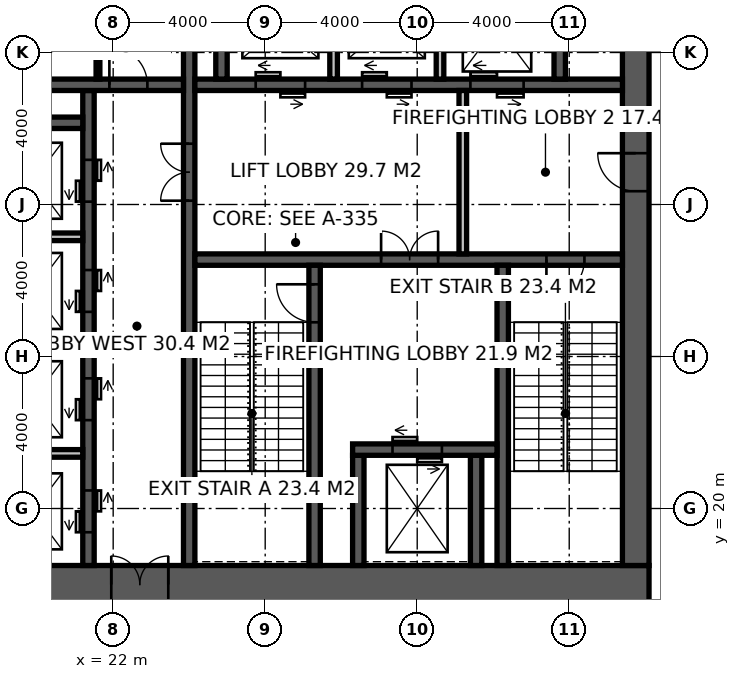
"""IFC4 building model, lengths in metres.
Left out: names, types, materials, properties, quantities, classifications, styles, units other than length and angle.
Written with IfcOpenShell. Run it as: python <this file> out.ifc"""

import sys

from ifc_helpers import new_model, si_unit, direction, frame, frame_2d, origin, place, context, subcontext, project, spatial, rectangle, extrude, element, fill, save


model = new_model("IFC4")
c1 = context("Model", 3, precision=1e-05, world=origin(), true_north=direction((0.0, 1.0)))
c2 = subcontext(c1, "Body", "Model", "MODEL_VIEW")
j1 = project(units=[si_unit("LENGTHUNIT", "METRE"), si_unit("PLANEANGLEUNIT", "RADIAN")], contexts=[c1])
p1 = place(None, origin())
s1 = spatial("IfcSite", under=j1, at=p1, CompositionType="ELEMENT")
p2 = place(p1, origin())
s2 = spatial("IfcBuilding", under=s1, at=p2, CompositionType="ELEMENT")
p3 = place(p2, frame((0.0, 0.0, 209.2)))
s3 = spatial("IfcBuildingStorey", under=s2, at=p3, CompositionType="ELEMENT", Elevation=209.2)
p4 = place(p3, frame((18.5, 18.0, -0.15), z_axis=(0.0, 0.0, 1.0), x_axis=(1.0, 0.0, 0.0)))
e1 = element("IfcWall", 1, at=p4, inside=s3, PredefinedType="SHEAR", context=c2, shape_type="SweptSolid", body=[
    extrude(rectangle(XDim=17.6, YDim=1.0, at=frame_2d((8.8, 0.0))), origin(), (0.0, 0.0, 1.0), 5.0),
])
p5 = place(p4, frame((3.45, 0.0, 0.15)))
e2 = element("IfcOpeningElement", 2, at=p5, cuts=e1, PredefinedType="OPENING", context=c2, shape_type="SweptSolid", body=[
    extrude(rectangle(XDim=1.5, YDim=2.4, at=frame_2d((0.75, 1.2))), frame((0.0, 0.51, 0.0), z_axis=(0.0, -1.0, 0.0), x_axis=(1.0, 0.0, 0.0)), (0.0, 0.0, 1.0), 1.02),
])
p6 = place(p3, frame((35.75, 18.5, -0.15), z_axis=(0.0, 0.0, 1.0), x_axis=(0.0, 1.0, 0.0)))
e3 = element("IfcWall", 3, at=p6, inside=s3, PredefinedType="SHEAR", context=c2, shape_type="SweptSolid", body=[
    extrude(rectangle(XDim=17.0, YDim=0.7, at=frame_2d((8.5, 0.0))), origin(), (0.0, 0.0, 1.0), 5.0),
])
p7 = place(p6, frame((9.85, 0.0, 0.15)))
e4 = element("IfcOpeningElement", 4, at=p7, cuts=e3, PredefinedType="OPENING", context=c2, shape_type="SweptSolid", body=[
    extrude(rectangle(XDim=1.0, YDim=2.2, at=frame_2d((0.5, 1.1))), frame((0.0, 0.36, 0.0), z_axis=(0.0, -1.0, 0.0), x_axis=(1.0, 0.0, 0.0)), (0.0, 0.0, 1.0), 0.72),
])
p8 = place(p3, frame((24.0, 18.5, -0.15), z_axis=(0.0, 0.0, 1.0), x_axis=(0.0, 1.0, 0.0)))
e5 = element("IfcWall", 5, at=p8, inside=s3, PredefinedType="SHEAR", context=c2, shape_type="SweptSolid", body=[
    extrude(rectangle(XDim=17.0, YDim=0.3, at=frame_2d((8.5, 0.0))), origin(), (0.0, 0.0, 1.0), 5.0),
])
p9 = place(p8, frame((9.6, 0.0, 0.15)))
e6 = element("IfcOpeningElement", 6, at=p9, cuts=e5, PredefinedType="OPENING", context=c2, shape_type="SweptSolid", body=[
    extrude(rectangle(XDim=1.5, YDim=2.4, at=frame_2d((0.75, 1.2))), frame((0.0, 0.16, 0.0), z_axis=(0.0, -1.0, 0.0), x_axis=(1.0, 0.0, 0.0)), (0.0, 0.0, 1.0), 0.32),
])
p10 = place(p3, frame((24.15, 26.55, -0.15), z_axis=(0.0, 0.0, 1.0), x_axis=(1.0, 0.0, 0.0)))
e7 = element("IfcWall", 7, at=p10, inside=s3, PredefinedType="SHEAR", context=c2, shape_type="SweptSolid", body=[
    extrude(rectangle(XDim=11.25, YDim=0.3, at=frame_2d((5.625, 0.0))), origin(), (0.0, 0.0, 1.0), 5.0),
])
p11 = place(p10, frame((9.25, 0.0, 0.15)))
e8 = element("IfcOpeningElement", 8, at=p11, cuts=e7, PredefinedType="OPENING", context=c2, shape_type="SweptSolid", body=[
    extrude(rectangle(XDim=1.0, YDim=2.2, at=frame_2d((0.5, 1.1))), frame((0.0, 0.16, 0.0), z_axis=(0.0, -1.0, 0.0), x_axis=(1.0, 0.0, 0.0)), (0.0, 0.0, 1.0), 0.32),
])
p12 = place(p10, frame((4.9, 0.0, 0.15)))
e9 = element("IfcOpeningElement", 9, at=p12, cuts=e7, PredefinedType="OPENING", context=c2, shape_type="SweptSolid", body=[
    extrude(rectangle(XDim=1.5, YDim=2.4, at=frame_2d((0.75, 1.2))), frame((0.0, 0.16, 0.0), z_axis=(0.0, -1.0, 0.0), x_axis=(1.0, 0.0, 0.0)), (0.0, 0.0, 1.0), 0.32),
])
p13 = place(p3, frame((27.3, 18.5, -0.15), z_axis=(0.0, 0.0, 1.0), x_axis=(0.0, 1.0, 0.0)))
e10 = element("IfcWall", 10, at=p13, inside=s3, PredefinedType="SHEAR", context=c2, shape_type="SweptSolid", body=[
    extrude(rectangle(XDim=7.9, YDim=0.3, at=frame_2d((3.95, 0.0))), origin(), (0.0, 0.0, 1.0), 5.0),
])
p14 = place(p13, frame((6.4, 0.0, 0.15)))
e11 = element("IfcOpeningElement", 11, at=p14, cuts=e10, PredefinedType="OPENING", context=c2, shape_type="SweptSolid", body=[
    extrude(rectangle(XDim=1.0, YDim=2.2, at=frame_2d((0.5, 1.1))), frame((0.0, 0.16, 0.0), z_axis=(0.0, -1.0, 0.0), x_axis=(1.0, 0.0, 0.0)), (0.0, 0.0, 1.0), 0.32),
])
p15 = place(p3, frame((32.25, 18.5, -0.15), z_axis=(0.0, 0.0, 1.0), x_axis=(0.0, 1.0, 0.0)))
e12 = element("IfcWall", 12, at=p15, inside=s3, PredefinedType="SHEAR", context=c2, shape_type="SweptSolid", body=[
    extrude(rectangle(XDim=7.9, YDim=0.3, at=frame_2d((3.95, 0.0))), origin(), (0.0, 0.0, 1.0), 5.0),
])
for number, where, z_axis, x_axis in (
    (13, (28.45, 18.5, -0.15), (0.0, 0.0, 1.0), (0.0, 1.0, 0.0)),
    (14, (31.55, 18.5, -0.15), (0.0, 0.0, 1.0), (0.0, 1.0, 0.0)),
):
    element("IfcWall", number, at=place(p3, frame(where, z_axis=z_axis, x_axis=x_axis)), inside=s3, PredefinedType="SHEAR", context=c2, shape_type="SweptSolid", body=[
        extrude(rectangle(XDim=2.9, YDim=0.3, at=frame_2d((1.45, 0.0))), origin(), (0.0, 0.0, 1.0), 5.0),
    ])
p16 = place(p3, frame((28.3, 21.55, -0.15), z_axis=(0.0, 0.0, 1.0), x_axis=(1.0, 0.0, 0.0)))
e15 = element("IfcWall", 15, at=p16, inside=s3, PredefinedType="SHEAR", context=c2, shape_type="SweptSolid", body=[
    extrude(rectangle(XDim=3.8, YDim=0.3, at=frame_2d((1.9, 0.0))), origin(), (0.0, 0.0, 1.0), 5.0),
])
p17 = place(p16, frame((1.05, 0.0, 0.15)))
e16 = element("IfcOpeningElement", 16, at=p17, cuts=e15, PredefinedType="OPENING", context=c2, shape_type="SweptSolid", body=[
    extrude(rectangle(XDim=1.3, YDim=2.4, at=frame_2d((0.65, 1.2))), frame((0.0, 0.16, 0.0), z_axis=(0.0, -1.0, 0.0), x_axis=(1.0, 0.0, 0.0)), (0.0, 0.0, 1.0), 0.32),
])
p18 = place(p3, frame((24.15, 31.15, -0.15), z_axis=(0.0, 0.0, 1.0), x_axis=(1.0, 0.0, 0.0)))
e17 = element("IfcWall", 17, at=p18, inside=s3, PredefinedType="SHEAR", context=c2, shape_type="SweptSolid", body=[
    extrude(rectangle(XDim=11.25, YDim=0.3, at=frame_2d((5.625, 0.0))), origin(), (0.0, 0.0, 1.0), 5.0),
])
p19 = place(p18, frame((1.6, 0.0, 0.15)))
e18 = element("IfcOpeningElement", 18, at=p19, cuts=e17, PredefinedType="OPENING", context=c2, shape_type="SweptSolid", body=[
    extrude(rectangle(XDim=1.3, YDim=2.4, at=frame_2d((0.65, 1.2))), frame((0.0, 0.16, 0.0), z_axis=(0.0, -1.0, 0.0), x_axis=(1.0, 0.0, 0.0)), (0.0, 0.0, 1.0), 0.32),
])
p20 = place(p18, frame((4.4, 0.0, 0.15)))
e19 = element("IfcOpeningElement", 19, at=p20, cuts=e17, PredefinedType="OPENING", context=c2, shape_type="SweptSolid", body=[
    extrude(rectangle(XDim=1.3, YDim=2.4, at=frame_2d((0.65, 1.2))), frame((0.0, 0.16, 0.0), z_axis=(0.0, -1.0, 0.0), x_axis=(1.0, 0.0, 0.0)), (0.0, 0.0, 1.0), 0.32),
])
p21 = place(p18, frame((7.25, 0.0, 0.15)))
e20 = element("IfcOpeningElement", 20, at=p21, cuts=e17, PredefinedType="OPENING", context=c2, shape_type="SweptSolid", body=[
    extrude(rectangle(XDim=1.4, YDim=2.4, at=frame_2d((0.7, 1.2))), frame((0.0, 0.16, 0.0), z_axis=(0.0, -1.0, 0.0), x_axis=(1.0, 0.0, 0.0)), (0.0, 0.0, 1.0), 0.32),
])
p22 = place(p3, frame((21.35, 18.5, -0.15), z_axis=(0.0, 0.0, 1.0), x_axis=(0.0, 1.0, 0.0)))
e21 = element("IfcWall", 21, at=p22, inside=s3, PredefinedType="SHEAR", context=c2, shape_type="SweptSolid", body=[
    extrude(rectangle(XDim=12.5, YDim=0.3, at=frame_2d((6.25, 0.0))), origin(), (0.0, 0.0, 1.0), 5.0),
])
p23 = place(p22, frame((0.875, 0.0, 0.15)))
e22 = element("IfcOpeningElement", 22, at=p23, cuts=e21, PredefinedType="OPENING", context=c2, shape_type="SweptSolid", body=[
    extrude(rectangle(XDim=1.1, YDim=2.2, at=frame_2d((0.55, 1.1))), frame((0.0, 0.16, 0.0), z_axis=(0.0, -1.0, 0.0), x_axis=(1.0, 0.0, 0.0)), (0.0, 0.0, 1.0), 0.32),
])
p24 = place(p22, frame((3.825, 0.0, 0.15)))
e23 = element("IfcOpeningElement", 23, at=p24, cuts=e21, PredefinedType="OPENING", context=c2, shape_type="SweptSolid", body=[
    extrude(rectangle(XDim=1.1, YDim=2.2, at=frame_2d((0.55, 1.1))), frame((0.0, 0.16, 0.0), z_axis=(0.0, -1.0, 0.0), x_axis=(1.0, 0.0, 0.0)), (0.0, 0.0, 1.0), 0.32),
])
p25 = place(p22, frame((6.675, 0.0, 0.15)))
e24 = element("IfcOpeningElement", 24, at=p25, cuts=e21, PredefinedType="OPENING", context=c2, shape_type="SweptSolid", body=[
    extrude(rectangle(XDim=1.1, YDim=2.2, at=frame_2d((0.55, 1.1))), frame((0.0, 0.16, 0.0), z_axis=(0.0, -1.0, 0.0), x_axis=(1.0, 0.0, 0.0)), (0.0, 0.0, 1.0), 0.32),
])
p26 = place(p22, frame((9.575, 0.0, 0.15)))
e25 = element("IfcOpeningElement", 25, at=p26, cuts=e21, PredefinedType="OPENING", context=c2, shape_type="SweptSolid", body=[
    extrude(rectangle(XDim=1.1, YDim=2.2, at=frame_2d((0.55, 1.1))), frame((0.0, 0.16, 0.0), z_axis=(0.0, -1.0, 0.0), x_axis=(1.0, 0.0, 0.0)), (0.0, 0.0, 1.0), 0.32),
])
p27 = place(p3, frame((18.5, 31.15, -0.15), z_axis=(0.0, 0.0, 1.0), x_axis=(1.0, 0.0, 0.0)))
e26 = element("IfcWall", 26, at=p27, inside=s3, PredefinedType="SHEAR", context=c2, shape_type="SweptSolid", body=[
    extrude(rectangle(XDim=5.35, YDim=0.3, at=frame_2d((2.675, 0.0))), origin(), (0.0, 0.0, 1.0), 5.0),
])
p28 = place(p27, frame((3.4, 0.0, 0.15)))
e27 = element("IfcOpeningElement", 27, at=p28, cuts=e26, PredefinedType="OPENING", context=c2, shape_type="SweptSolid", body=[
    extrude(rectangle(XDim=1.0, YDim=2.2, at=frame_2d((0.5, 1.1))), frame((0.0, 0.16, 0.0), z_axis=(0.0, -1.0, 0.0), x_axis=(1.0, 0.0, 0.0)), (0.0, 0.0, 1.0), 0.32),
])
p29 = place(p3, frame((18.5, 30.15, -0.15), z_axis=(0.0, 0.0, 1.0), x_axis=(1.0, 0.0, 0.0)))
e28 = element("IfcWall", 28, at=p29, inside=s3, PredefinedType="SHEAR", context=c2, shape_type="SweptSolid", body=[
    extrude(rectangle(XDim=2.7, YDim=0.3, at=frame_2d((1.35, 0.0))), origin(), (0.0, 0.0, 1.0), 5.0),
])
for number, where, z_axis, x_axis in (
    (29, (24.85, 31.3, -0.15), (0.0, 0.0, 1.0), (0.0, 1.0, 0.0)),
    (30, (33.75, 31.3, -0.15), (0.0, 0.0, 1.0), (0.0, 1.0, 0.0)),
):
    element("IfcWall", number, at=place(p3, frame(where, z_axis=z_axis, x_axis=x_axis)), inside=s3, PredefinedType="SHEAR", context=c2, shape_type="SweptSolid", body=[
        extrude(rectangle(XDim=4.2, YDim=0.3, at=frame_2d((2.1, 0.0))), origin(), (0.0, 0.0, 1.0), 5.0),
    ])
for number, where, z_axis, x_axis in (
    (31, (27.8, 31.3, -0.15), (0.0, 0.0, 1.0), (0.0, 1.0, 0.0)),
    (32, (30.6, 31.3, -0.15), (0.0, 0.0, 1.0), (0.0, 1.0, 0.0)),
):
    element("IfcWall", number, at=place(p3, frame(where, z_axis=z_axis, x_axis=x_axis)), inside=s3, PredefinedType="SOLIDWALL", context=c2, shape_type="SweptSolid", body=[
        extrude(rectangle(XDim=2.8, YDim=0.2, at=frame_2d((1.4, 0.0))), origin(), (0.0, 0.0, 1.0), 5.0),
    ])
for number, where, z_axis, x_axis in (
    (33, (18.5, 21.45, -0.15), (0.0, 0.0, 1.0), (1.0, 0.0, 0.0)),
    (34, (18.5, 24.3, -0.15), (0.0, 0.0, 1.0), (1.0, 0.0, 0.0)),
    (35, (18.5, 27.15, -0.15), (0.0, 0.0, 1.0), (1.0, 0.0, 0.0)),
):
    element("IfcWall", number, at=place(p3, frame(where, z_axis=z_axis, x_axis=x_axis)), inside=s3, PredefinedType="SOLIDWALL", context=c2, shape_type="SweptSolid", body=[
        extrude(rectangle(XDim=2.7, YDim=0.2, at=frame_2d((1.35, 0.0))), origin(), (0.0, 0.0, 1.0), 5.0),
    ])
p30 = place(p3, frame((31.2, 26.7, 0.0), z_axis=(0.0, 0.0, 1.0), x_axis=(0.0, 1.0, 0.0)))
e36 = element("IfcWall", 36, at=p30, inside=s3, PredefinedType="SOLIDWALL", context=c2, shape_type="SweptSolid", body=[
    extrude(rectangle(XDim=4.3, YDim=0.2, at=frame_2d((2.15, 0.0))), origin(), (0.0, 0.0, 1.0), 4.85),
])
p31 = place(p3, frame((21.6, 31.3, 0.0), z_axis=(0.0, 0.0, 1.0), x_axis=(0.0, 1.0, 0.0)))
e37 = element("IfcWall", 37, at=p31, inside=s3, PredefinedType="PARTITIONING", context=c2, shape_type="SweptSolid", body=[
    extrude(rectangle(XDim=4.2, YDim=0.1, at=frame_2d((2.1, 0.0))), origin(), (0.0, 0.0, 1.0), 4.85),
])
p32 = place(p31, frame((1.55, 0.0, 0.0)))
e38 = element("IfcOpeningElement", 38, at=p32, cuts=e37, PredefinedType="OPENING", context=c2, shape_type="SweptSolid", body=[
    extrude(rectangle(XDim=1.0, YDim=2.2, at=frame_2d((0.5, 1.1))), frame((0.0, 0.06, 0.0), z_axis=(0.0, -1.0, 0.0), x_axis=(1.0, 0.0, 0.0)), (0.0, 0.0, 1.0), 0.12),
])
p33 = place(p14, origin())
e39 = element("IfcDoor", 39, at=p33, inside=s3, OperationType="SINGLE_SWING_RIGHT", PredefinedType="DOOR", context=c2, shape_type="SweptSolid", body=[
    extrude(rectangle(XDim=1.0, YDim=2.2, at=frame_2d((0.5, 1.1))), frame((0.0, 0.025, 0.0), z_axis=(0.0, -1.0, 0.0), x_axis=(1.0, 0.0, 0.0)), (0.0, 0.0, 1.0), 0.05),
])
fill(e11, e39)
p34 = place(p11, frame((1.0, 0.0, 0.0), z_axis=(0.0, 0.0, 1.0), x_axis=(-1.0, 0.0, 0.0)))
e40 = element("IfcDoor", 40, at=p34, inside=s3, OperationType="SINGLE_SWING_RIGHT", PredefinedType="DOOR", context=c2, shape_type="SweptSolid", body=[
    extrude(rectangle(XDim=1.0, YDim=2.2, at=frame_2d((0.5, 1.1))), frame((0.0, 0.025, 0.0), z_axis=(0.0, -1.0, 0.0), x_axis=(1.0, 0.0, 0.0)), (0.0, 0.0, 1.0), 0.05),
])
fill(e8, e40)
p35 = place(p7, origin())
e41 = element("IfcDoor", 41, at=p35, inside=s3, OperationType="SINGLE_SWING_RIGHT", PredefinedType="DOOR", context=c2, shape_type="SweptSolid", body=[
    extrude(rectangle(XDim=1.0, YDim=2.2, at=frame_2d((0.5, 1.1))), frame((0.0, 0.025, 0.0), z_axis=(0.0, -1.0, 0.0), x_axis=(1.0, 0.0, 0.0)), (0.0, 0.0, 1.0), 0.05),
])
fill(e4, e41)
p36 = place(p12, origin())
e42 = element("IfcDoor", 42, at=p36, inside=s3, OperationType="DOUBLE_DOOR_DOUBLE_SWING", PredefinedType="DOOR", context=c2, shape_type="SweptSolid", body=[
    extrude(rectangle(XDim=1.5, YDim=2.4, at=frame_2d((0.75, 1.2))), frame((0.0, 0.025, 0.0), z_axis=(0.0, -1.0, 0.0), x_axis=(1.0, 0.0, 0.0)), (0.0, 0.0, 1.0), 0.05),
])
fill(e9, e42)
p37 = place(p9, origin())
e43 = element("IfcDoor", 43, at=p37, inside=s3, OperationType="DOUBLE_DOOR_DOUBLE_SWING", PredefinedType="DOOR", context=c2, shape_type="SweptSolid", body=[
    extrude(rectangle(XDim=1.5, YDim=2.4, at=frame_2d((0.75, 1.2))), frame((0.0, 0.025, 0.0), z_axis=(0.0, -1.0, 0.0), x_axis=(1.0, 0.0, 0.0)), (0.0, 0.0, 1.0), 0.05),
])
fill(e6, e43)
p38 = place(p28, origin())
e44 = element("IfcDoor", 44, at=p38, inside=s3, OperationType="SINGLE_SWING_LEFT", PredefinedType="DOOR", context=c2, shape_type="SweptSolid", body=[
    extrude(rectangle(XDim=1.0, YDim=2.2, at=frame_2d((0.5, 1.1))), frame((0.0, 0.025, 0.0), z_axis=(0.0, -1.0, 0.0), x_axis=(1.0, 0.0, 0.0)), (0.0, 0.0, 1.0), 0.05),
])
fill(e27, e44)
p39 = place(p5, origin())
e45 = element("IfcDoor", 45, at=p39, inside=s3, OperationType="DOUBLE_DOOR_DOUBLE_SWING", PredefinedType="DOOR", context=c2, shape_type="SweptSolid", body=[
    extrude(rectangle(XDim=1.5, YDim=2.4, at=frame_2d((0.75, 1.2))), frame((0.0, 0.025, 0.0), z_axis=(0.0, -1.0, 0.0), x_axis=(1.0, 0.0, 0.0)), (0.0, 0.0, 1.0), 0.05),
])
fill(e2, e45)
p40 = place(p17, origin())
e46 = element("IfcDoor", 46, at=p40, inside=s3, OperationType="DOUBLE_DOOR_SLIDING", PredefinedType="DOOR", context=c2, shape_type="SweptSolid", body=[
    extrude(rectangle(XDim=1.3, YDim=2.4, at=frame_2d((0.65, 1.2))), frame((0.0, 0.025, 0.0), z_axis=(0.0, -1.0, 0.0), x_axis=(1.0, 0.0, 0.0)), (0.0, 0.0, 1.0), 0.05),
])
fill(e16, e46)
p41 = place(p19, origin())
e47 = element("IfcDoor", 47, at=p41, inside=s3, OperationType="DOUBLE_DOOR_SLIDING", PredefinedType="DOOR", context=c2, shape_type="SweptSolid", body=[
    extrude(rectangle(XDim=1.3, YDim=2.4, at=frame_2d((0.65, 1.2))), frame((0.0, 0.025, 0.0), z_axis=(0.0, -1.0, 0.0), x_axis=(1.0, 0.0, 0.0)), (0.0, 0.0, 1.0), 0.05),
])
fill(e18, e47)
p42 = place(p20, origin())
e48 = element("IfcDoor", 48, at=p42, inside=s3, OperationType="DOUBLE_DOOR_SLIDING", PredefinedType="DOOR", context=c2, shape_type="SweptSolid", body=[
    extrude(rectangle(XDim=1.3, YDim=2.4, at=frame_2d((0.65, 1.2))), frame((0.0, 0.025, 0.0), z_axis=(0.0, -1.0, 0.0), x_axis=(1.0, 0.0, 0.0)), (0.0, 0.0, 1.0), 0.05),
])
fill(e19, e48)
p43 = place(p21, origin())
e49 = element("IfcDoor", 49, at=p43, inside=s3, OperationType="DOUBLE_DOOR_SLIDING", PredefinedType="DOOR", context=c2, shape_type="SweptSolid", body=[
    extrude(rectangle(XDim=1.4, YDim=2.4, at=frame_2d((0.7, 1.2))), frame((0.0, 0.025, 0.0), z_axis=(0.0, -1.0, 0.0), x_axis=(1.0, 0.0, 0.0)), (0.0, 0.0, 1.0), 0.05),
])
fill(e20, e49)
p44 = place(p23, origin())
e50 = element("IfcDoor", 50, at=p44, inside=s3, OperationType="DOUBLE_DOOR_SLIDING", PredefinedType="DOOR", context=c2, shape_type="SweptSolid", body=[
    extrude(rectangle(XDim=1.1, YDim=2.2, at=frame_2d((0.55, 1.1))), frame((0.0, 0.025, 0.0), z_axis=(0.0, -1.0, 0.0), x_axis=(1.0, 0.0, 0.0)), (0.0, 0.0, 1.0), 0.05),
])
fill(e22, e50)
p45 = place(p24, origin())
e51 = element("IfcDoor", 51, at=p45, inside=s3, OperationType="DOUBLE_DOOR_SLIDING", PredefinedType="DOOR", context=c2, shape_type="SweptSolid", body=[
    extrude(rectangle(XDim=1.1, YDim=2.2, at=frame_2d((0.55, 1.1))), frame((0.0, 0.025, 0.0), z_axis=(0.0, -1.0, 0.0), x_axis=(1.0, 0.0, 0.0)), (0.0, 0.0, 1.0), 0.05),
])
fill(e23, e51)
p46 = place(p25, origin())
e52 = element("IfcDoor", 52, at=p46, inside=s3, OperationType="DOUBLE_DOOR_SLIDING", PredefinedType="DOOR", context=c2, shape_type="SweptSolid", body=[
    extrude(rectangle(XDim=1.1, YDim=2.2, at=frame_2d((0.55, 1.1))), frame((0.0, 0.025, 0.0), z_axis=(0.0, -1.0, 0.0), x_axis=(1.0, 0.0, 0.0)), (0.0, 0.0, 1.0), 0.05),
])
fill(e24, e52)
p47 = place(p26, origin())
e53 = element("IfcDoor", 53, at=p47, inside=s3, OperationType="DOUBLE_DOOR_SLIDING", PredefinedType="DOOR", context=c2, shape_type="SweptSolid", body=[
    extrude(rectangle(XDim=1.1, YDim=2.2, at=frame_2d((0.55, 1.1))), frame((0.0, 0.025, 0.0), z_axis=(0.0, -1.0, 0.0), x_axis=(1.0, 0.0, 0.0)), (0.0, 0.0, 1.0), 0.05),
])
fill(e25, e53)
save(model, sys.argv[1])
